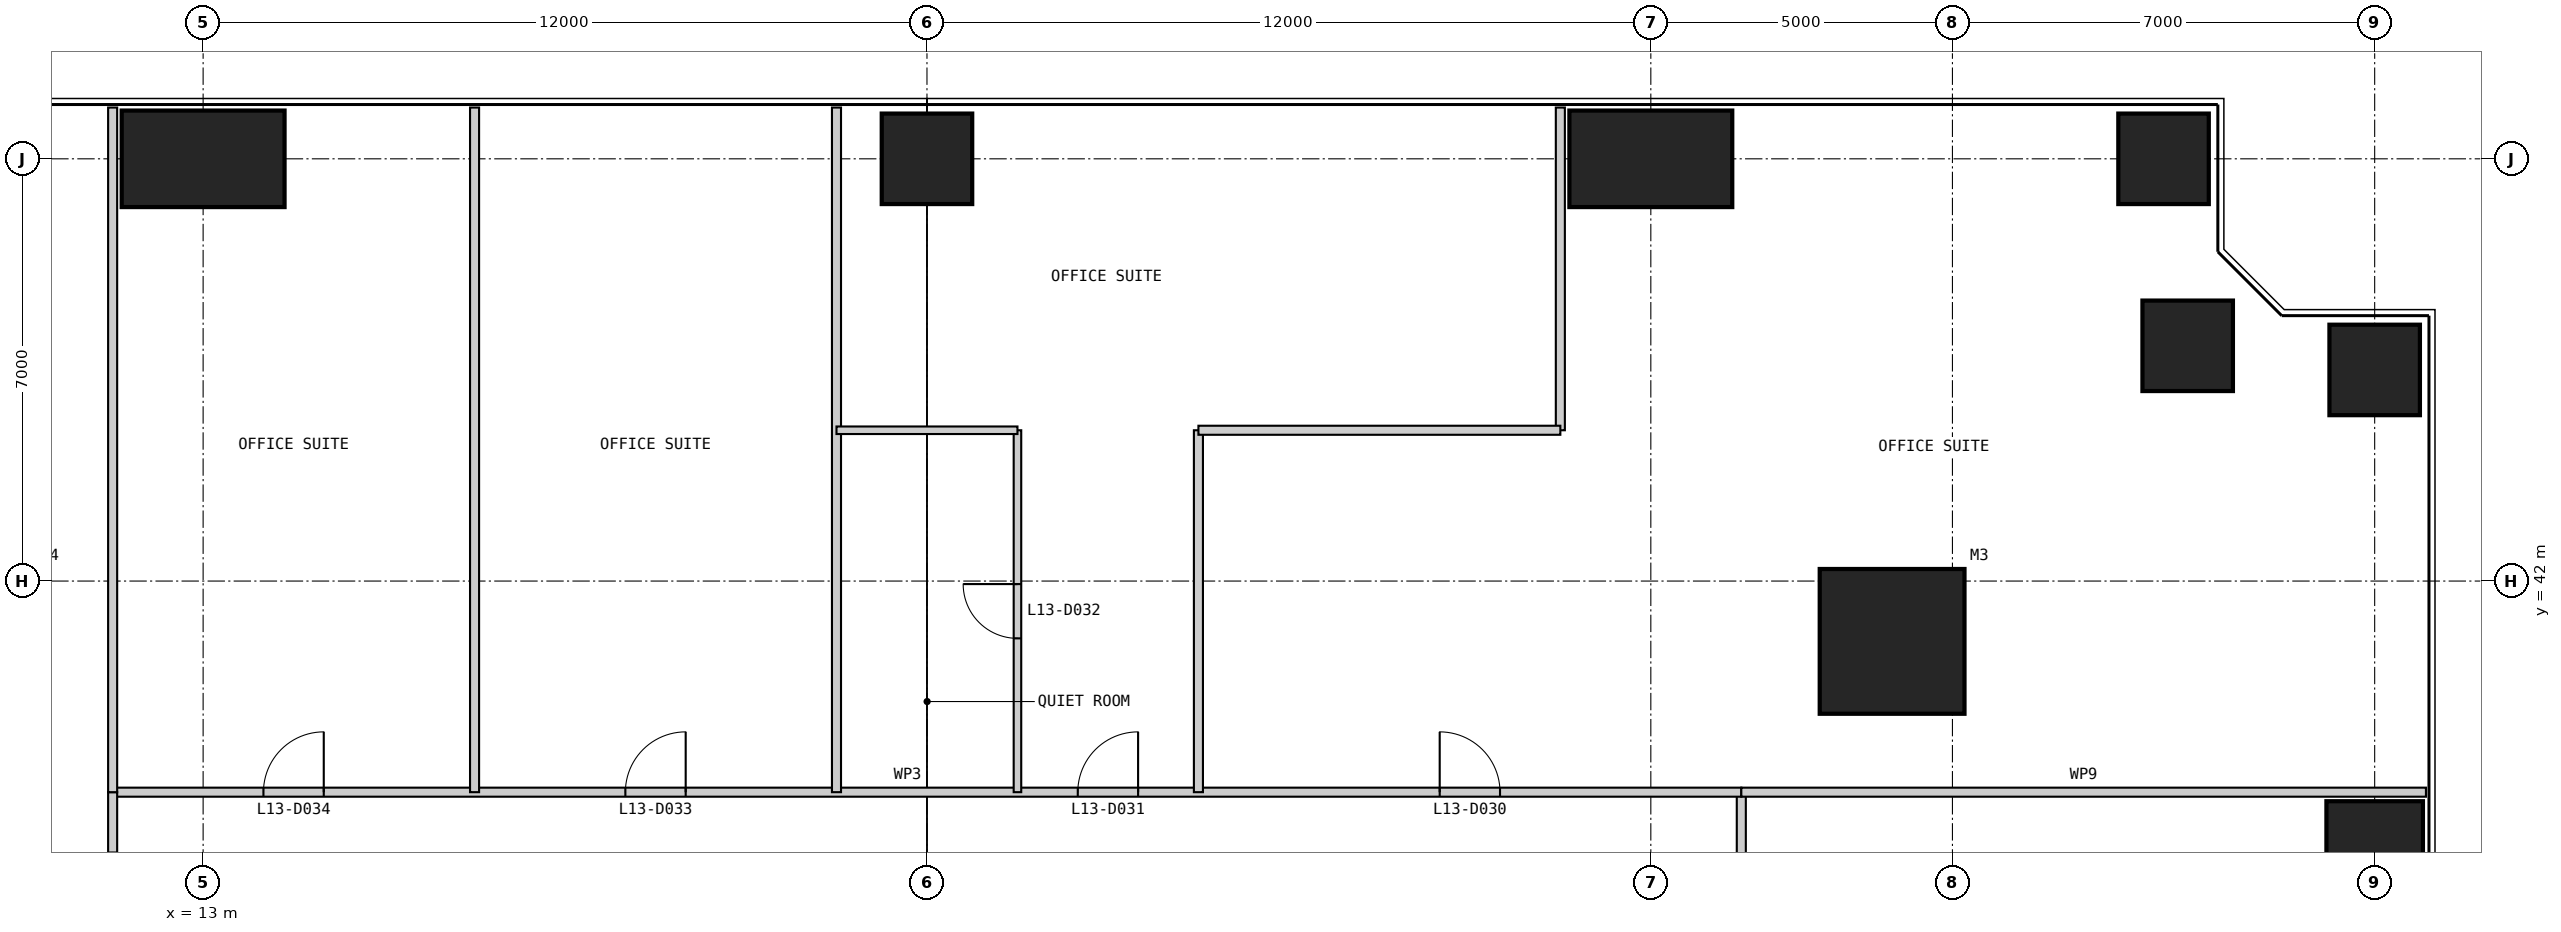
"""IFC4 building model, lengths in metres.
Left out: names, types, materials, properties, quantities, classifications, styles, units other than length and angle.
Written with IfcOpenShell. Run it as: python <this file> out.ifc"""

import sys

from ifc_helpers import new_model, si_unit, direction, frame, frame_2d, origin, origin_2d, place, context, subcontext, project, spatial, rectangle, extrude, element, fill, save


model = new_model("IFC4")
c1 = context("Model", 3, precision=1e-05, world=origin(), true_north=direction((0.0, 1.0)))
c2 = subcontext(c1, "Body", "Model", "MODEL_VIEW")
j1 = project(units=[si_unit("LENGTHUNIT", "METRE"), si_unit("PLANEANGLEUNIT", "RADIAN")], contexts=[c1])
p1 = place(None, origin())
s1 = spatial("IfcSite", under=j1, at=p1, CompositionType="ELEMENT")
p2 = place(p1, origin())
s2 = spatial("IfcBuilding", under=s1, at=p2, CompositionType="ELEMENT")
p3 = place(p2, frame((0.0, 0.0, 59.0)))
s3 = spatial("IfcBuildingStorey", under=s2, at=p3, CompositionType="ELEMENT", Elevation=59.0)
p4 = place(p3, frame((41.0, 41.0, 0.0), z_axis=(0.0, 0.0, 1.0), x_axis=(1.0, 0.0, 0.0)))
e1 = element("IfcColumn", 1, at=p4, inside=s3, PredefinedType="COLUMN", context=c2, shape_type="SweptSolid", body=[
    extrude(rectangle(XDim=2.4, YDim=2.4, at=origin_2d()), origin(), (0.0, 0.0, 1.0), 4.0),
])
p5 = place(p3, frame((49.0, 37.0, 0.0), z_axis=(0.0, 0.0, 1.0), x_axis=(1.0, 0.0, 0.0)))
e2 = element("IfcColumn", 2, at=p5, inside=s3, PredefinedType="COLUMN", context=c2, shape_type="SweptSolid", body=[
    extrude(rectangle(XDim=1.6, YDim=2.7, at=origin_2d()), origin(), (0.0, 0.0, 1.0), 4.0),
])
for number, where, z_axis, x_axis in (
    (3, (49.0, 45.5, 0.0), (0.0, 0.0, 1.0), (1.0, 0.0, 0.0)),
    (4, (45.9, 45.9, 0.0), (0.0, 0.0, 1.0), (1.0, 0.0, 0.0)),
    (5, (45.5, 49.0, 0.0), (0.0, 0.0, 1.0), (1.0, 0.0, 0.0)),
):
    element("IfcColumn", number, at=place(p3, frame(where, z_axis=z_axis, x_axis=x_axis)), inside=s3, PredefinedType="COLUMN", context=c2, shape_type="SweptSolid", body=[
        extrude(rectangle(XDim=1.5, YDim=1.5, at=origin_2d()), origin(), (0.0, 0.0, 1.0), 4.0),
    ])
p6 = place(p3, frame((37.0, 49.0, 0.0), z_axis=(0.0, 0.0, 1.0), x_axis=(1.0, 0.0, 0.0)))
e6 = element("IfcColumn", 6, at=p6, inside=s3, PredefinedType="COLUMN", context=c2, shape_type="SweptSolid", body=[
    extrude(rectangle(XDim=2.7, YDim=1.6, at=origin_2d()), origin(), (0.0, 0.0, 1.0), 4.0),
])
p7 = place(p3, frame((25.0, 49.0, 0.0), z_axis=(0.0, 0.0, 1.0), x_axis=(1.0, 0.0, 0.0)))
e7 = element("IfcColumn", 7, at=p7, inside=s3, PredefinedType="COLUMN", context=c2, shape_type="SweptSolid", body=[
    extrude(rectangle(XDim=1.5, YDim=1.5, at=origin_2d()), origin(), (0.0, 0.0, 1.0), 4.0),
])
p8 = place(p3, frame((13.0, 49.0, 0.0), z_axis=(0.0, 0.0, 1.0), x_axis=(1.0, 0.0, 0.0)))
e8 = element("IfcColumn", 8, at=p8, inside=s3, PredefinedType="COLUMN", context=c2, shape_type="SweptSolid", body=[
    extrude(rectangle(XDim=2.7, YDim=1.6, at=origin_2d()), origin(), (0.0, 0.0, 1.0), 4.0),
])
p9 = place(p3, frame((38.5, 11.5, 0.0), z_axis=(0.0, 0.0, 1.0), x_axis=(0.0, 1.0, 0.0)))
e9 = element("IfcWall", 9, at=p9, inside=s3, PredefinedType="PARTITIONING", context=c2, shape_type="SweptSolid", body=[
    extrude(rectangle(XDim=27.0, YDim=0.15, at=frame_2d((13.5, 0.0))), origin(), (0.0, 0.0, 1.0), 3.85),
])
p10 = place(p9, frame((2.5, 0.0, 0.0)))
e10 = element("IfcOpeningElement", 10, at=p10, cuts=e9, PredefinedType="OPENING", context=c2, shape_type="SweptSolid", body=[
    extrude(rectangle(XDim=1.0, YDim=2.2, at=frame_2d((0.5, 1.1))), frame((0.0, 0.085, 0.0), z_axis=(0.0, -1.0, 0.0), x_axis=(1.0, 0.0, 0.0)), (0.0, 0.0, 1.0), 0.17),
])
p11 = place(p9, frame((13.0, 0.0, 0.0)))
e11 = element("IfcOpeningElement", 11, at=p11, cuts=e9, PredefinedType="OPENING", context=c2, shape_type="SweptSolid", body=[
    extrude(rectangle(XDim=1.0, YDim=2.2, at=frame_2d((0.5, 1.1))), frame((0.0, 0.085, 0.0), z_axis=(0.0, -1.0, 0.0), x_axis=(1.0, 0.0, 0.0)), (0.0, 0.0, 1.0), 0.17),
])
p12 = place(p9, frame((23.5, 0.0, 0.0)))
e12 = element("IfcOpeningElement", 12, at=p12, cuts=e9, PredefinedType="OPENING", context=c2, shape_type="SweptSolid", body=[
    extrude(rectangle(XDim=1.0, YDim=2.2, at=frame_2d((0.5, 1.1))), frame((0.0, 0.085, 0.0), z_axis=(0.0, -1.0, 0.0), x_axis=(1.0, 0.0, 0.0)), (0.0, 0.0, 1.0), 0.17),
])
p13 = place(p3, frame((38.5, 38.5, 0.0), z_axis=(0.0, 0.0, 1.0), x_axis=(-1.0, 0.0, 0.0)))
e13 = element("IfcWall", 13, at=p13, inside=s3, PredefinedType="PARTITIONING", context=c2, shape_type="SweptSolid", body=[
    extrude(rectangle(XDim=27.0, YDim=0.15, at=frame_2d((13.5, 0.0))), origin(), (0.0, 0.0, 1.0), 3.85),
])
p14 = place(p13, frame((4.0, 0.0, 0.0)))
e14 = element("IfcOpeningElement", 14, at=p14, cuts=e13, PredefinedType="OPENING", context=c2, shape_type="SweptSolid", body=[
    extrude(rectangle(XDim=1.0, YDim=2.2, at=frame_2d((0.5, 1.1))), frame((0.0, 0.085, 0.0), z_axis=(0.0, -1.0, 0.0), x_axis=(1.0, 0.0, 0.0)), (0.0, 0.0, 1.0), 0.17),
])
p15 = place(p13, frame((10.0, 0.0, 0.0)))
e15 = element("IfcOpeningElement", 15, at=p15, cuts=e13, PredefinedType="OPENING", context=c2, shape_type="SweptSolid", body=[
    extrude(rectangle(XDim=1.0, YDim=2.2, at=frame_2d((0.5, 1.1))), frame((0.0, 0.085, 0.0), z_axis=(0.0, -1.0, 0.0), x_axis=(1.0, 0.0, 0.0)), (0.0, 0.0, 1.0), 0.17),
])
p16 = place(p13, frame((17.5, 0.0, 0.0)))
e16 = element("IfcOpeningElement", 16, at=p16, cuts=e13, PredefinedType="OPENING", context=c2, shape_type="SweptSolid", body=[
    extrude(rectangle(XDim=1.0, YDim=2.2, at=frame_2d((0.5, 1.1))), frame((0.0, 0.085, 0.0), z_axis=(0.0, -1.0, 0.0), x_axis=(1.0, 0.0, 0.0)), (0.0, 0.0, 1.0), 0.17),
])
p17 = place(p13, frame((23.5, 0.0, 0.0)))
e17 = element("IfcOpeningElement", 17, at=p17, cuts=e13, PredefinedType="OPENING", context=c2, shape_type="SweptSolid", body=[
    extrude(rectangle(XDim=1.0, YDim=2.2, at=frame_2d((0.5, 1.1))), frame((0.0, 0.085, 0.0), z_axis=(0.0, -1.0, 0.0), x_axis=(1.0, 0.0, 0.0)), (0.0, 0.0, 1.0), 0.17),
])
p18 = place(p3, frame((49.85, 38.5, 0.0), z_axis=(0.0, 0.0, 1.0), x_axis=(-1.0, 0.0, 0.0)))
e18 = element("IfcWall", 18, at=p18, inside=s3, PredefinedType="PARTITIONING", context=c2, shape_type="SweptSolid", body=[
    extrude(rectangle(XDim=11.35, YDim=0.15, at=frame_2d((5.675, 0.0))), origin(), (0.0, 0.0, 1.0), 3.85),
])
p19 = place(p3, frame((35.5, 49.85, 0.0), z_axis=(0.0, 0.0, 1.0), x_axis=(0.0, -1.0, 0.0)))
e19 = element("IfcWall", 19, at=p19, inside=s3, PredefinedType="PARTITIONING", context=c2, shape_type="SweptSolid", body=[
    extrude(rectangle(XDim=5.35, YDim=0.15, at=frame_2d((2.675, 0.0))), origin(), (0.0, 0.0, 1.0), 3.85),
])
p20 = place(p3, frame((29.5, 44.5, 0.0), z_axis=(0.0, 0.0, 1.0), x_axis=(0.0, -1.0, 0.0)))
e20 = element("IfcWall", 20, at=p20, inside=s3, PredefinedType="PARTITIONING", context=c2, shape_type="SweptSolid", body=[
    extrude(rectangle(XDim=6.0, YDim=0.15, at=frame_2d((3.0, 0.0))), origin(), (0.0, 0.0, 1.0), 3.85),
])
p21 = place(p3, frame((26.5, 44.5, 0.0), z_axis=(0.0, 0.0, 1.0), x_axis=(0.0, -1.0, 0.0)))
e21 = element("IfcWall", 21, at=p21, inside=s3, PredefinedType="PARTITIONING", context=c2, shape_type="SweptSolid", body=[
    extrude(rectangle(XDim=6.0, YDim=0.125, at=frame_2d((3.0, 0.0))), origin(), (0.0, 0.0, 1.0), 3.85),
])
p22 = place(p21, frame((2.55, 0.0, 0.0)))
e22 = element("IfcOpeningElement", 22, at=p22, cuts=e21, PredefinedType="OPENING", context=c2, shape_type="SweptSolid", body=[
    extrude(rectangle(XDim=0.9, YDim=2.2, at=frame_2d((0.45, 1.1))), frame((0.0, 0.073, 0.0), z_axis=(0.0, -1.0, 0.0), x_axis=(1.0, 0.0, 0.0)), (0.0, 0.0, 1.0), 0.145),
])
for number, where, z_axis, x_axis in (
    (23, (23.5, 49.85, 0.0), (0.0, 0.0, 1.0), (0.0, -1.0, 0.0)),
    (24, (17.5, 49.85, 0.0), (0.0, 0.0, 1.0), (0.0, -1.0, 0.0)),
):
    element("IfcWall", number, at=place(p3, frame(where, z_axis=z_axis, x_axis=x_axis)), inside=s3, PredefinedType="PARTITIONING", context=c2, shape_type="SweptSolid", body=[
        extrude(rectangle(XDim=11.35, YDim=0.15, at=frame_2d((5.675, 0.0))), origin(), (0.0, 0.0, 1.0), 3.85),
    ])
p23 = place(p3, frame((35.5, 44.5, 0.0), z_axis=(0.0, 0.0, 1.0), x_axis=(-1.0, 0.0, 0.0)))
e25 = element("IfcWall", 25, at=p23, inside=s3, PredefinedType="PARTITIONING", context=c2, shape_type="SweptSolid", body=[
    extrude(rectangle(XDim=6.0, YDim=0.15, at=frame_2d((3.0, 0.0))), origin(), (0.0, 0.0, 1.0), 3.85),
])
p24 = place(p3, frame((26.5, 44.5, 0.0), z_axis=(0.0, 0.0, 1.0), x_axis=(-1.0, 0.0, 0.0)))
e26 = element("IfcWall", 26, at=p24, inside=s3, PredefinedType="PARTITIONING", context=c2, shape_type="SweptSolid", body=[
    extrude(rectangle(XDim=3.0, YDim=0.125, at=frame_2d((1.5, 0.0))), origin(), (0.0, 0.0, 1.0), 3.85),
])
p25 = place(p3, frame((11.5, 38.5, 0.0), z_axis=(0.0, 0.0, 1.0), x_axis=(0.0, -1.0, 0.0)))
e27 = element("IfcWall", 27, at=p25, inside=s3, PredefinedType="PARTITIONING", context=c2, shape_type="SweptSolid", body=[
    extrude(rectangle(XDim=27.0, YDim=0.15, at=frame_2d((13.5, 0.0))), origin(), (0.0, 0.0, 1.0), 3.85),
])
p26 = place(p25, frame((1.0, 0.0, 0.0)))
e28 = element("IfcOpeningElement", 28, at=p26, cuts=e27, PredefinedType="OPENING", context=c2, shape_type="SweptSolid", body=[
    extrude(rectangle(XDim=1.0, YDim=2.2, at=frame_2d((0.5, 1.1))), frame((0.0, 0.085, 0.0), z_axis=(0.0, -1.0, 0.0), x_axis=(1.0, 0.0, 0.0)), (0.0, 0.0, 1.0), 0.17),
])
p27 = place(p25, frame((19.0, 0.0, 0.0)))
e29 = element("IfcOpeningElement", 29, at=p27, cuts=e27, PredefinedType="OPENING", context=c2, shape_type="SweptSolid", body=[
    extrude(rectangle(XDim=1.0, YDim=2.2, at=frame_2d((0.5, 1.1))), frame((0.0, 0.085, 0.0), z_axis=(0.0, -1.0, 0.0), x_axis=(1.0, 0.0, 0.0)), (0.0, 0.0, 1.0), 0.17),
])
p28 = place(p3, frame((11.5, 49.85, 0.0), z_axis=(0.0, 0.0, 1.0), x_axis=(0.0, -1.0, 0.0)))
e30 = element("IfcWall", 30, at=p28, inside=s3, PredefinedType="PARTITIONING", context=c2, shape_type="SweptSolid", body=[
    extrude(rectangle(XDim=11.35, YDim=0.15, at=frame_2d((5.675, 0.0))), origin(), (0.0, 0.0, 1.0), 3.85),
])
p29 = place(p14, frame((1.0, 0.0, 0.0), z_axis=(0.0, 0.0, 1.0), x_axis=(-1.0, 0.0, 0.0)))
e31 = element("IfcDoor", 31, at=p29, inside=s3, OperationType="SINGLE_SWING_LEFT", PredefinedType="DOOR", context=c2, shape_type="SweptSolid", body=[
    extrude(rectangle(XDim=1.0, YDim=2.2, at=frame_2d((0.5, 1.1))), frame((0.0, 0.025, 0.0), z_axis=(0.0, -1.0, 0.0), x_axis=(1.0, 0.0, 0.0)), (0.0, 0.0, 1.0), 0.05),
])
fill(e14, e31)
p30 = place(p15, frame((1.0, 0.0, 0.0), z_axis=(0.0, 0.0, 1.0), x_axis=(-1.0, 0.0, 0.0)))
e32 = element("IfcDoor", 32, at=p30, inside=s3, OperationType="SINGLE_SWING_RIGHT", PredefinedType="DOOR", context=c2, shape_type="SweptSolid", body=[
    extrude(rectangle(XDim=1.0, YDim=2.2, at=frame_2d((0.5, 1.1))), frame((0.0, 0.025, 0.0), z_axis=(0.0, -1.0, 0.0), x_axis=(1.0, 0.0, 0.0)), (0.0, 0.0, 1.0), 0.05),
])
fill(e15, e32)
p31 = place(p22, frame((0.9, 0.0, 0.0), z_axis=(0.0, 0.0, 1.0), x_axis=(-1.0, 0.0, 0.0)))
e33 = element("IfcDoor", 33, at=p31, inside=s3, OperationType="SINGLE_SWING_RIGHT", PredefinedType="DOOR", context=c2, shape_type="SweptSolid", body=[
    extrude(rectangle(XDim=0.9, YDim=2.2, at=frame_2d((0.45, 1.1))), frame((0.0, 0.025, 0.0), z_axis=(0.0, -1.0, 0.0), x_axis=(1.0, 0.0, 0.0)), (0.0, 0.0, 1.0), 0.05),
])
fill(e22, e33)
p32 = place(p16, frame((1.0, 0.0, 0.0), z_axis=(0.0, 0.0, 1.0), x_axis=(-1.0, 0.0, 0.0)))
e34 = element("IfcDoor", 34, at=p32, inside=s3, OperationType="SINGLE_SWING_RIGHT", PredefinedType="DOOR", context=c2, shape_type="SweptSolid", body=[
    extrude(rectangle(XDim=1.0, YDim=2.2, at=frame_2d((0.5, 1.1))), frame((0.0, 0.025, 0.0), z_axis=(0.0, -1.0, 0.0), x_axis=(1.0, 0.0, 0.0)), (0.0, 0.0, 1.0), 0.05),
])
fill(e16, e34)
p33 = place(p17, frame((1.0, 0.0, 0.0), z_axis=(0.0, 0.0, 1.0), x_axis=(-1.0, 0.0, 0.0)))
e35 = element("IfcDoor", 35, at=p33, inside=s3, OperationType="SINGLE_SWING_RIGHT", PredefinedType="DOOR", context=c2, shape_type="SweptSolid", body=[
    extrude(rectangle(XDim=1.0, YDim=2.2, at=frame_2d((0.5, 1.1))), frame((0.0, 0.025, 0.0), z_axis=(0.0, -1.0, 0.0), x_axis=(1.0, 0.0, 0.0)), (0.0, 0.0, 1.0), 0.05),
])
fill(e17, e35)
save(model, sys.argv[1])
